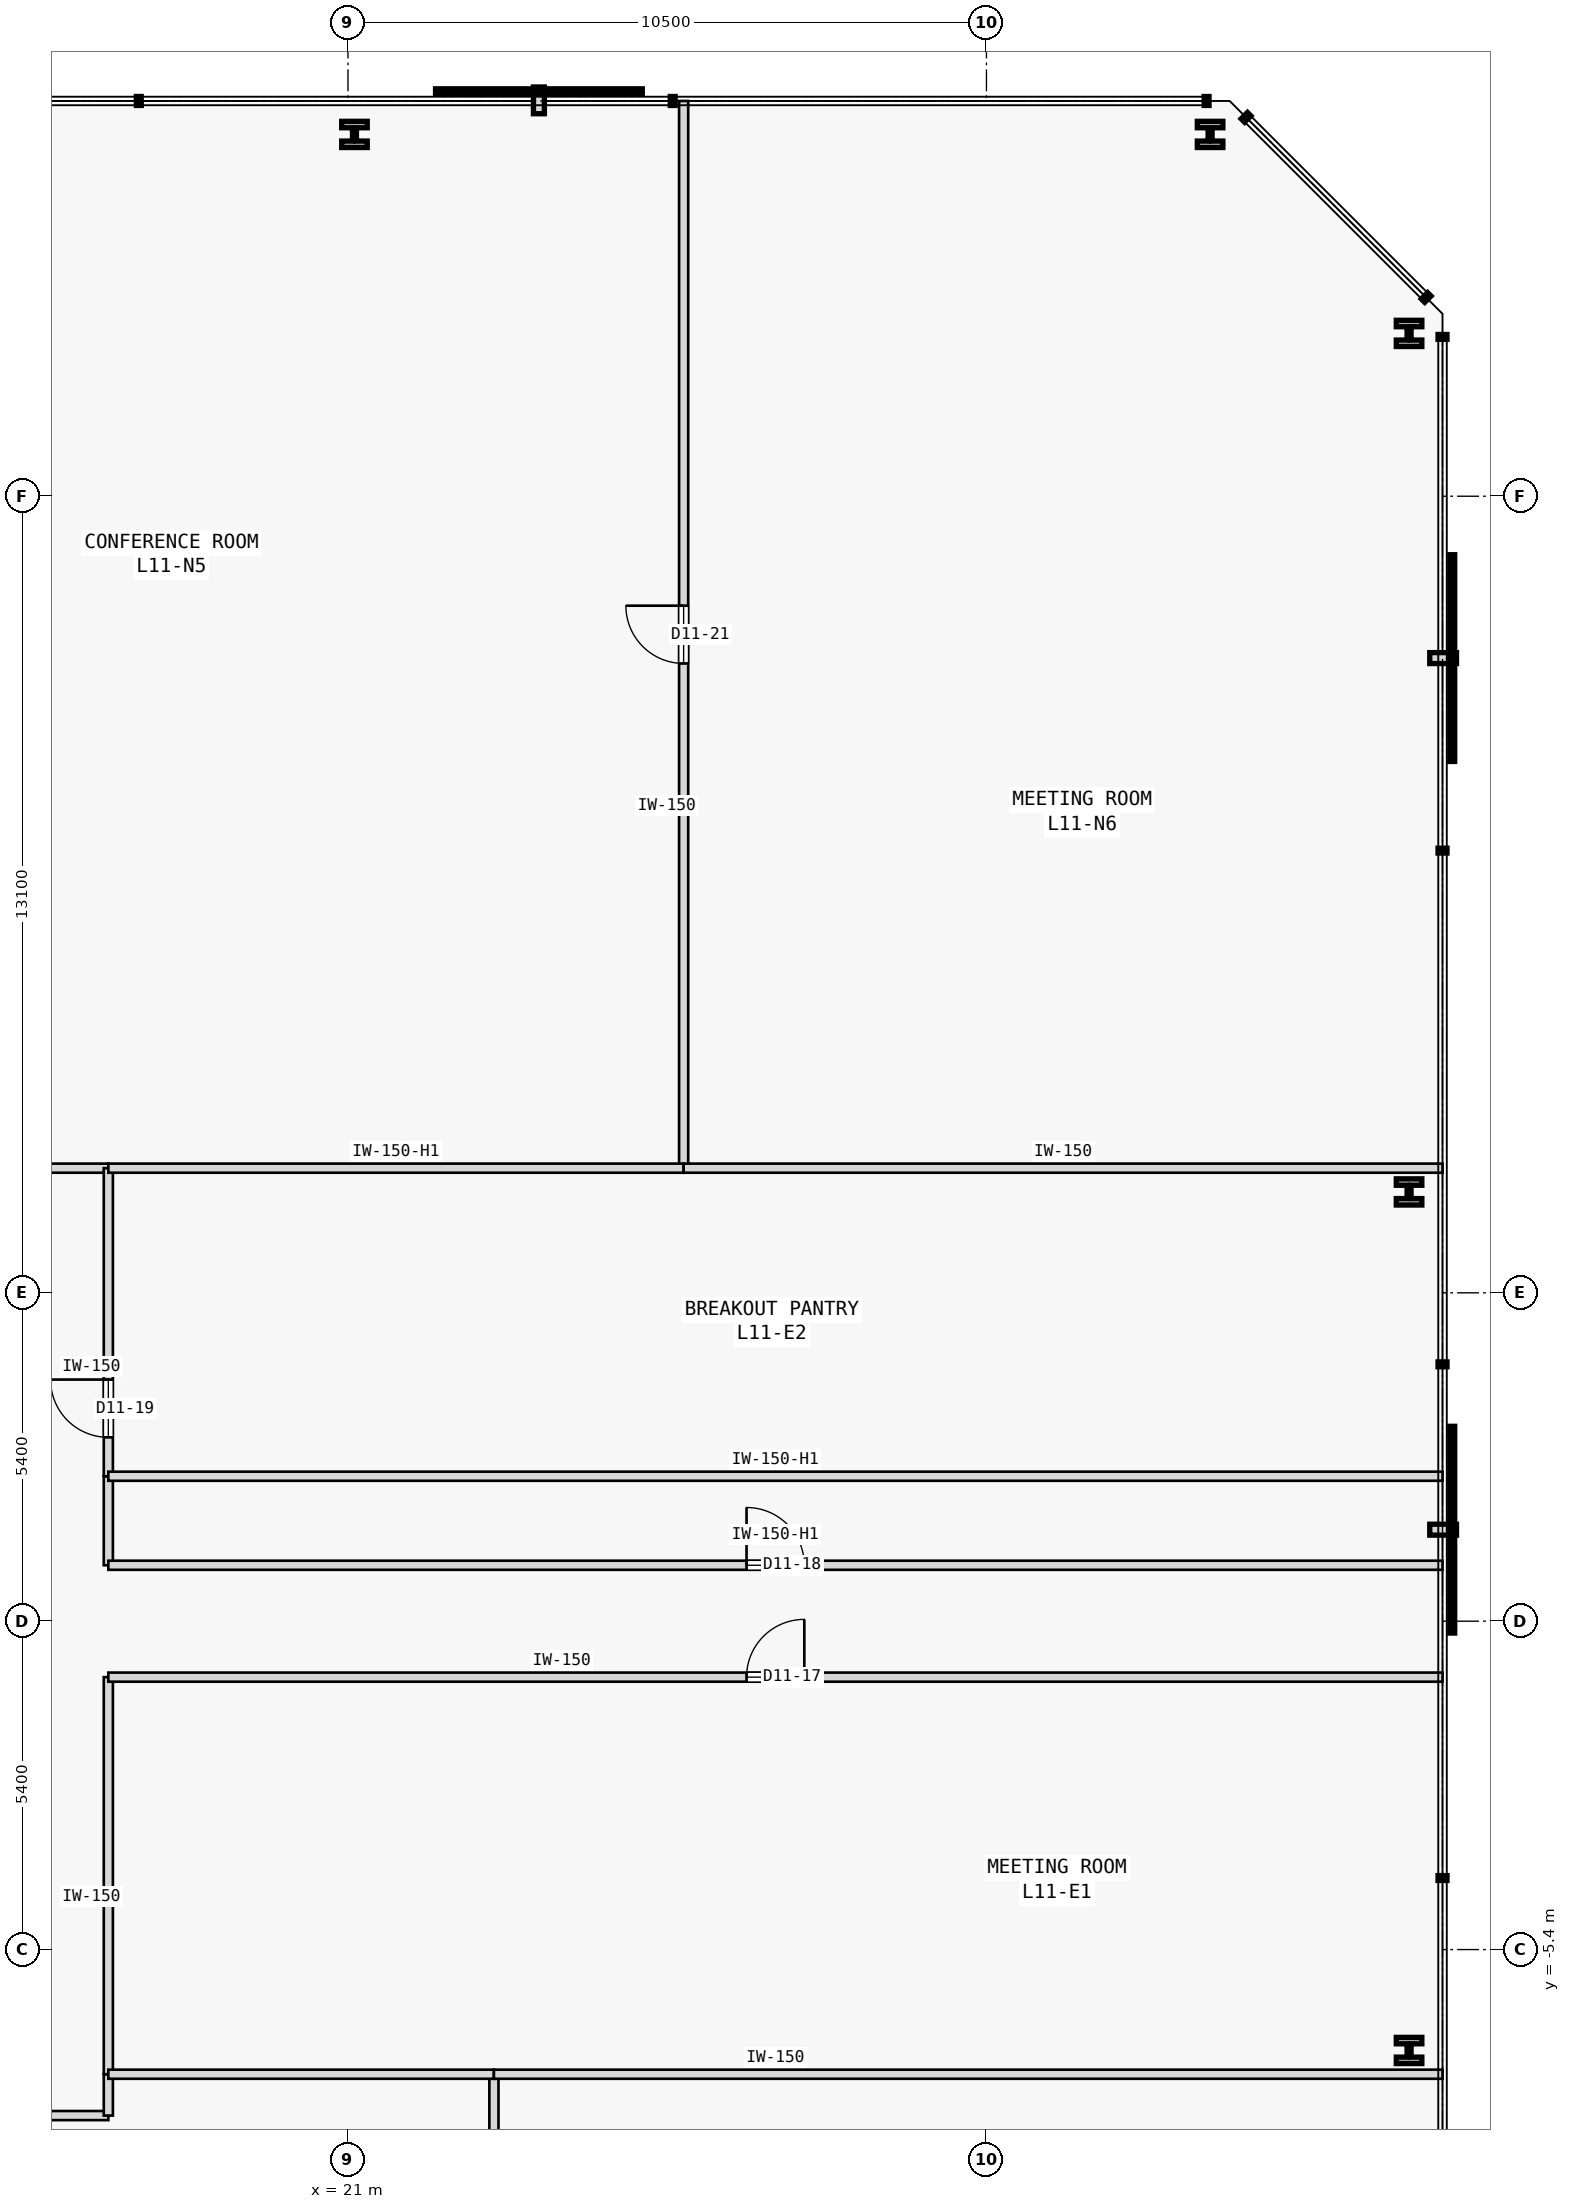
"""IFC4 building model, lengths in metres.
Left out: names, types, materials, properties, quantities, classifications, styles, units other than length and angle.
Written with IfcOpenShell. Run it as: python <this file> out.ifc"""

import sys

from ifc_helpers import new_model, si_unit, direction, frame, frame_2d, origin, origin_2d, place, context, subcontext, project, spatial, rectangle, i_section, extrude, element, fill, save


model = new_model("IFC4")
c1 = context("Model", 3, precision=1e-05, world=origin(), true_north=direction((0.0, 1.0)))
c2 = subcontext(c1, "Body", "Model", "MODEL_VIEW")
j1 = project(units=[si_unit("LENGTHUNIT", "METRE"), si_unit("PLANEANGLEUNIT", "RADIAN")], contexts=[c1])
p1 = place(None, origin())
s1 = spatial("IfcSite", under=j1, at=p1, CompositionType="ELEMENT")
p2 = place(p1, origin())
s2 = spatial("IfcBuilding", under=s1, at=p2, CompositionType="ELEMENT")
p3 = place(p2, frame((0.0, 0.0, 48.4)))
s3 = spatial("IfcBuildingStorey", under=s2, at=p3, CompositionType="ELEMENT", Elevation=48.4)
for number, where, z_axis, x_axis in (
    (1, (38.45, -7.059, 0.0), (0.0, 0.0, 1.0), (1.0, 0.0, 0.0)),
    (2, (38.45, 7.059, 0.0), (0.0, 0.0, 1.0), (1.0, 0.0, 0.0)),
    (3, (38.45, 21.178, 0.0), (0.0, 0.0, 1.0), (1.0, 0.0, 0.0)),
    (4, (35.178, 24.45, 0.0), (0.0, 0.0, 1.0), (1.0, 0.0, 0.0)),
    (5, (21.107, 24.45, 0.0), (0.0, 0.0, 1.0), (1.0, 0.0, 0.0)),
):
    element("IfcColumn", number, at=place(p3, frame(where, z_axis=z_axis, x_axis=x_axis)), inside=s3, PredefinedType="COLUMN", context=c2, shape_type="SweptSolid", body=[
        extrude(i_section(OverallWidth=0.42, OverallDepth=0.431, WebThickness=0.065, FlangeThickness=0.106, FilletRadius=0.015, at=origin_2d()), origin(), (0.0, 0.0, 1.0), 3.8),
    ])
p4 = place(p3, frame((10.92, 7.45, 0.0), z_axis=(0.0, 0.0, 1.0), x_axis=(1.0, 0.0, 0.0)))
e6 = element("IfcWall", 6, at=p4, inside=s3, PredefinedType="PARTITIONING", context=c2, shape_type="SweptSolid", body=[
    extrude(rectangle(XDim=6.139, YDim=0.15, at=frame_2d((3.07, 0.0))), origin(), (0.0, 0.0, 1.0), 3.575),
])
p5 = place(p4, frame((2.594, 0.0, 0.0)))
e7 = element("IfcOpeningElement", 7, at=p5, cuts=e6, PredefinedType="OPENING", context=c2, shape_type="SweptSolid", body=[
    extrude(rectangle(XDim=0.95, YDim=2.15, at=frame_2d((0.475, 1.075))), frame((0.0, 0.085, 0.0), z_axis=(0.0, -1.0, 0.0), x_axis=(1.0, 0.0, 0.0)), (0.0, 0.0, 1.0), 0.17),
])
p6 = place(p3, frame((7.8, -8.13, 0.0), z_axis=(0.0, 0.0, 1.0), x_axis=(1.0, 0.0, 0.0)))
e8 = element("IfcWall", 8, at=p6, inside=s3, PredefinedType="PARTITIONING", context=c2, shape_type="SweptSolid", body=[
    extrude(rectangle(XDim=9.259, YDim=0.15, at=frame_2d((4.629, 0.0))), origin(), (0.0, 0.0, 1.0), 3.575),
])
p7 = place(p6, frame((4.155, 0.0, 0.0)))
e9 = element("IfcOpeningElement", 9, at=p7, cuts=e8, PredefinedType="OPENING", context=c2, shape_type="SweptSolid", body=[
    extrude(rectangle(XDim=0.95, YDim=2.15, at=frame_2d((0.475, 1.075))), frame((0.0, 0.085, 0.0), z_axis=(0.0, -1.0, 0.0), x_axis=(1.0, 0.0, 0.0)), (0.0, 0.0, 1.0), 0.17),
])
p8 = place(p3, frame((17.059, -8.13, 0.0), z_axis=(0.0, 0.0, 1.0), x_axis=(0.0, 1.0, 0.0)))
e10 = element("IfcWall", 10, at=p8, inside=s3, PredefinedType="PARTITIONING", context=c2, shape_type="SweptSolid", body=[
    extrude(rectangle(XDim=0.68, YDim=0.15, at=frame_2d((0.34, 0.0))), origin(), (0.0, 0.0, 1.0), 3.575),
])
p9 = place(p3, frame((17.059, -7.45, 0.0), z_axis=(0.0, 0.0, 1.0), x_axis=(0.0, 1.0, 0.0)))
e11 = element("IfcWall", 11, at=p9, inside=s3, PredefinedType="PARTITIONING", context=c2, shape_type="SweptSolid", body=[
    extrude(rectangle(XDim=6.53, YDim=0.15, at=frame_2d((3.265, 0.0))), origin(), (0.0, 0.0, 1.0), 3.575),
])
p10 = place(p3, frame((17.059, -0.92, 0.0), z_axis=(0.0, 0.0, 1.0), x_axis=(1.0, 0.0, 0.0)))
e12 = element("IfcWall", 12, at=p10, inside=s3, PredefinedType="PARTITIONING", context=c2, shape_type="SweptSolid", body=[
    extrude(rectangle(XDim=21.941, YDim=0.15, at=frame_2d((10.97, 0.0))), origin(), (0.0, 0.0, 1.0), 3.575),
])
p11 = place(p10, frame((10.496, 0.0, 0.0)))
e13 = element("IfcOpeningElement", 13, at=p11, cuts=e12, PredefinedType="OPENING", context=c2, shape_type="SweptSolid", body=[
    extrude(rectangle(XDim=0.95, YDim=2.15, at=frame_2d((0.475, 1.075))), frame((0.0, 0.085, 0.0), z_axis=(0.0, -1.0, 0.0), x_axis=(1.0, 0.0, 0.0)), (0.0, 0.0, 1.0), 0.17),
])
p12 = place(p3, frame((17.059, 0.92, 0.0), z_axis=(0.0, 0.0, 1.0), x_axis=(0.0, 1.0, 0.0)))
e14 = element("IfcWall", 14, at=p12, inside=s3, PredefinedType="PARTITIONING", context=c2, shape_type="SweptSolid", body=[
    extrude(rectangle(XDim=1.464, YDim=0.15, at=frame_2d((0.732, 0.0))), origin(), (0.0, 0.0, 1.0), 3.575),
])
p13 = place(p3, frame((17.059, 0.92, 0.0), z_axis=(0.0, 0.0, 1.0), x_axis=(1.0, 0.0, 0.0)))
e15 = element("IfcWall", 15, at=p13, inside=s3, PredefinedType="PARTITIONING", context=c2, shape_type="SweptSolid", body=[
    extrude(rectangle(XDim=21.941, YDim=0.15, at=frame_2d((10.97, 0.0))), origin(), (0.0, 0.0, 1.0), 3.125),
])
p14 = place(p13, frame((10.496, 0.0, 0.0)))
e16 = element("IfcOpeningElement", 16, at=p14, cuts=e15, PredefinedType="OPENING", context=c2, shape_type="SweptSolid", body=[
    extrude(rectangle(XDim=0.95, YDim=2.15, at=frame_2d((0.475, 1.075))), frame((0.0, 0.085, 0.0), z_axis=(0.0, -1.0, 0.0), x_axis=(1.0, 0.0, 0.0)), (0.0, 0.0, 1.0), 0.17),
])
p15 = place(p3, frame((17.059, 2.384, 0.0), z_axis=(0.0, 0.0, 1.0), x_axis=(0.0, 1.0, 0.0)))
e17 = element("IfcWall", 17, at=p15, inside=s3, PredefinedType="PARTITIONING", context=c2, shape_type="SweptSolid", body=[
    extrude(rectangle(XDim=5.066, YDim=0.15, at=frame_2d((2.533, 0.0))), origin(), (0.0, 0.0, 1.0), 3.575),
])
p16 = place(p15, frame((0.639, 0.0, 0.0)))
e18 = element("IfcOpeningElement", 18, at=p16, cuts=e17, PredefinedType="OPENING", context=c2, shape_type="SweptSolid", body=[
    extrude(rectangle(XDim=0.95, YDim=2.15, at=frame_2d((0.475, 1.075))), frame((0.0, 0.085, 0.0), z_axis=(0.0, -1.0, 0.0), x_axis=(1.0, 0.0, 0.0)), (0.0, 0.0, 1.0), 0.17),
])
p17 = place(p3, frame((26.52, 7.45, 0.0), z_axis=(0.0, 0.0, 1.0), x_axis=(0.0, 1.0, 0.0)))
e19 = element("IfcWall", 19, at=p17, inside=s3, PredefinedType="PARTITIONING", context=c2, shape_type="SweptSolid", body=[
    extrude(rectangle(XDim=17.55, YDim=0.15, at=frame_2d((8.775, 0.0))), origin(), (0.0, 0.0, 1.0), 3.575),
])
p18 = place(p17, frame((8.3, 0.0, 0.0)))
e20 = element("IfcOpeningElement", 20, at=p18, cuts=e19, PredefinedType="OPENING", context=c2, shape_type="SweptSolid", body=[
    extrude(rectangle(XDim=0.95, YDim=2.15, at=frame_2d((0.475, 1.075))), frame((0.0, 0.085, 0.0), z_axis=(0.0, -1.0, 0.0), x_axis=(1.0, 0.0, 0.0)), (0.0, 0.0, 1.0), 0.17),
])
p19 = place(p3, frame((17.059, 7.45, 0.0), z_axis=(0.0, 0.0, 1.0), x_axis=(1.0, 0.0, 0.0)))
e21 = element("IfcWall", 21, at=p19, inside=s3, PredefinedType="PARTITIONING", context=c2, shape_type="SweptSolid", body=[
    extrude(rectangle(XDim=9.461, YDim=0.15, at=frame_2d((4.73, 0.0))), origin(), (0.0, 0.0, 1.0), 3.125),
])
p20 = place(p3, frame((26.52, 7.45, 0.0), z_axis=(0.0, 0.0, 1.0), x_axis=(1.0, 0.0, 0.0)))
e22 = element("IfcWall", 22, at=p20, inside=s3, PredefinedType="PARTITIONING", context=c2, shape_type="SweptSolid", body=[
    extrude(rectangle(XDim=12.48, YDim=0.15, at=frame_2d((6.24, 0.0))), origin(), (0.0, 0.0, 1.0), 3.575),
])
p21 = place(p3, frame((23.4, -25.0, 0.0), z_axis=(0.0, 0.0, 1.0), x_axis=(0.0, 1.0, 0.0)))
e23 = element("IfcWall", 23, at=p21, inside=s3, PredefinedType="PARTITIONING", context=c2, shape_type="SweptSolid", body=[
    extrude(rectangle(XDim=17.55, YDim=0.15, at=frame_2d((8.775, 0.0))), origin(), (0.0, 0.0, 1.0), 3.575),
])
p22 = place(p21, frame((8.3, 0.0, 0.0)))
e24 = element("IfcOpeningElement", 24, at=p22, cuts=e23, PredefinedType="OPENING", context=c2, shape_type="SweptSolid", body=[
    extrude(rectangle(XDim=0.95, YDim=2.15, at=frame_2d((0.475, 1.075))), frame((0.0, 0.085, 0.0), z_axis=(0.0, -1.0, 0.0), x_axis=(1.0, 0.0, 0.0)), (0.0, 0.0, 1.0), 0.17),
])
p23 = place(p3, frame((17.059, -7.45, 0.0), z_axis=(0.0, 0.0, 1.0), x_axis=(1.0, 0.0, 0.0)))
e25 = element("IfcWall", 25, at=p23, inside=s3, PredefinedType="PARTITIONING", context=c2, shape_type="SweptSolid", body=[
    extrude(rectangle(XDim=6.341, YDim=0.15, at=frame_2d((3.17, 0.0))), origin(), (0.0, 0.0, 1.0), 3.575),
])
p24 = place(p3, frame((23.4, -7.45, 0.0), z_axis=(0.0, 0.0, 1.0), x_axis=(1.0, 0.0, 0.0)))
e26 = element("IfcWall", 26, at=p24, inside=s3, PredefinedType="PARTITIONING", context=c2, shape_type="SweptSolid", body=[
    extrude(rectangle(XDim=15.6, YDim=0.15, at=frame_2d((7.8, 0.0))), origin(), (0.0, 0.0, 1.0), 3.575),
])
p25 = place(p3, frame((17.059, 2.384, 0.0), z_axis=(0.0, 0.0, 1.0), x_axis=(1.0, 0.0, 0.0)))
e27 = element("IfcWall", 27, at=p25, inside=s3, PredefinedType="PARTITIONING", context=c2, shape_type="SweptSolid", body=[
    extrude(rectangle(XDim=21.941, YDim=0.15, at=frame_2d((10.97, 0.0))), origin(), (0.0, 0.0, 1.0), 3.125),
])
p26 = place(p11, origin())
e28 = element("IfcDoor", 28, at=p26, inside=s3, OperationType="SINGLE_SWING_RIGHT", PredefinedType="DOOR", context=c2, shape_type="SweptSolid", body=[
    extrude(rectangle(XDim=0.95, YDim=2.15, at=frame_2d((0.475, 1.075))), frame((0.0, 0.025, 0.0), z_axis=(0.0, -1.0, 0.0), x_axis=(1.0, 0.0, 0.0)), (0.0, 0.0, 1.0), 0.05),
])
fill(e13, e28)
p27 = place(p14, origin())
e29 = element("IfcDoor", 29, at=p27, inside=s3, OperationType="SINGLE_SWING_LEFT", PredefinedType="DOOR", context=c2, shape_type="SweptSolid", body=[
    extrude(rectangle(XDim=0.95, YDim=2.15, at=frame_2d((0.475, 1.075))), frame((0.0, 0.025, 0.0), z_axis=(0.0, -1.0, 0.0), x_axis=(1.0, 0.0, 0.0)), (0.0, 0.0, 1.0), 0.05),
])
fill(e16, e29)
p28 = place(p16, origin())
e30 = element("IfcDoor", 30, at=p28, inside=s3, OperationType="SINGLE_SWING_RIGHT", PredefinedType="DOOR", context=c2, shape_type="SweptSolid", body=[
    extrude(rectangle(XDim=0.95, YDim=2.15, at=frame_2d((0.475, 1.075))), frame((0.0, 0.025, 0.0), z_axis=(0.0, -1.0, 0.0), x_axis=(1.0, 0.0, 0.0)), (0.0, 0.0, 1.0), 0.05),
])
fill(e18, e30)
p29 = place(p18, origin())
e31 = element("IfcDoor", 31, at=p29, inside=s3, OperationType="SINGLE_SWING_RIGHT", PredefinedType="DOOR", context=c2, shape_type="SweptSolid", body=[
    extrude(rectangle(XDim=0.95, YDim=2.15, at=frame_2d((0.475, 1.075))), frame((0.0, 0.025, 0.0), z_axis=(0.0, -1.0, 0.0), x_axis=(1.0, 0.0, 0.0)), (0.0, 0.0, 1.0), 0.05),
])
fill(e20, e31)
save(model, sys.argv[1])
